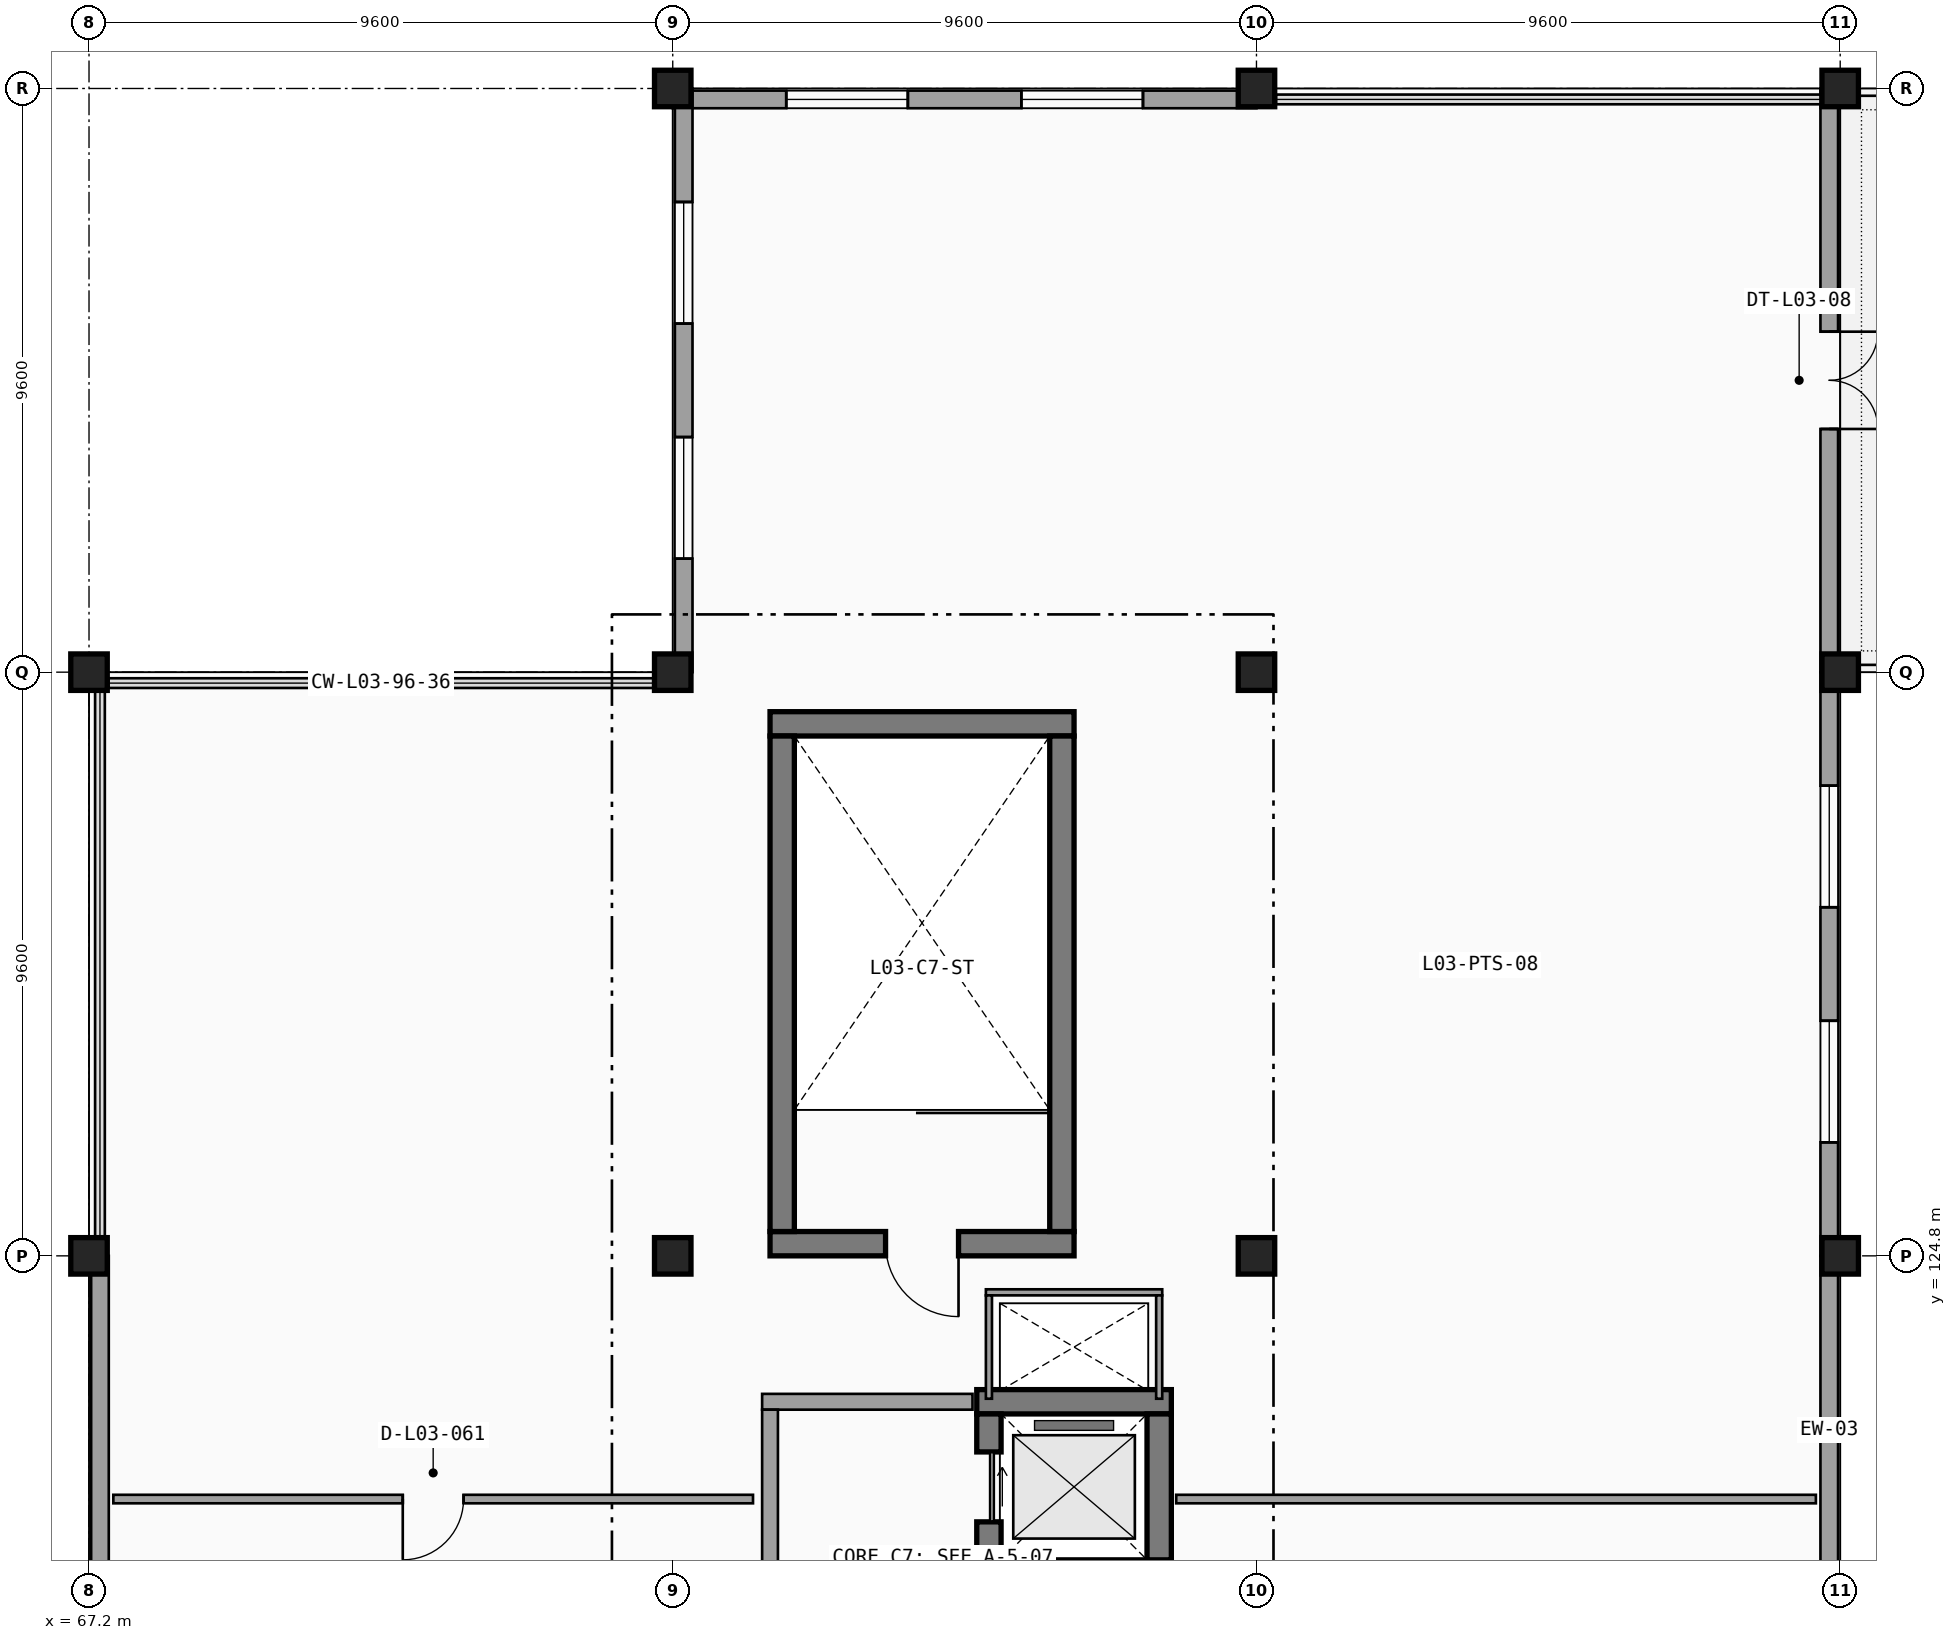
"""IFC4 building model, lengths in metres.
Left out: names, types, materials, properties, quantities, classifications, styles, units other than length and angle.
Written with IfcOpenShell. Run it as: python <this file> out.ifc"""

import sys

from ifc_helpers import new_model, si_unit, direction, frame, frame_2d, origin, origin_2d, place, context, subcontext, project, spatial, rectangle, extrude, element, fill, save


model = new_model("IFC4")
c1 = context("Model", 3, precision=1e-05, world=origin(), true_north=direction((0.0, 1.0)))
c2 = subcontext(c1, "Body", "Model", "MODEL_VIEW")
j1 = project(units=[si_unit("LENGTHUNIT", "METRE"), si_unit("PLANEANGLEUNIT", "RADIAN")], contexts=[c1])
p1 = place(None, origin())
s1 = spatial("IfcSite", under=j1, at=p1, CompositionType="ELEMENT")
p2 = place(p1, origin())
s2 = spatial("IfcBuilding", under=s1, at=p2, CompositionType="ELEMENT")
p3 = place(p2, frame((0.0, 0.0, 14.1)))
s3 = spatial("IfcBuildingStorey", under=s2, at=p3, CompositionType="ELEMENT", Elevation=14.1)
for number, where, z_axis, x_axis in (
    (1, (67.2, 124.8, 0.0), (0.0, 0.0, 1.0), (1.0, 0.0, 0.0)),
    (2, (67.2, 134.4, 0.0), (0.0, 0.0, 1.0), (1.0, 0.0, 0.0)),
    (3, (76.8, 124.8, 0.0), (0.0, 0.0, 1.0), (1.0, 0.0, 0.0)),
    (4, (76.8, 134.4, 0.0), (0.0, 0.0, 1.0), (1.0, 0.0, 0.0)),
    (5, (76.8, 144.0, 0.0), (0.0, 0.0, 1.0), (1.0, 0.0, 0.0)),
    (6, (86.4, 124.8, 0.0), (0.0, 0.0, 1.0), (1.0, 0.0, 0.0)),
    (7, (86.4, 134.4, 0.0), (0.0, 0.0, 1.0), (1.0, 0.0, 0.0)),
    (8, (86.4, 144.0, 0.0), (0.0, 0.0, 1.0), (1.0, 0.0, 0.0)),
    (9, (96.0, 124.8, 0.0), (0.0, 0.0, 1.0), (1.0, 0.0, 0.0)),
    (10, (96.0, 134.4, 0.0), (0.0, 0.0, 1.0), (1.0, 0.0, 0.0)),
    (11, (96.0, 144.0, 0.0), (0.0, 0.0, 1.0), (1.0, 0.0, 0.0)),
):
    element("IfcColumn", number, at=place(p3, frame(where, z_axis=z_axis, x_axis=x_axis)), inside=s3, PredefinedType="COLUMN", context=c2, shape_type="SweptSolid", body=[
        extrude(rectangle(XDim=0.6, YDim=0.6, at=origin_2d()), origin(), (0.0, 0.0, 1.0), 4.5),
    ])
p4 = place(p3, frame((95.82, 115.2, 0.0), z_axis=(0.0, 0.0, 1.0), x_axis=(0.0, 1.0, 0.0)))
e12 = element("IfcWall", 12, at=p4, inside=s3, PredefinedType="SOLIDWALL", context=c2, shape_type="SweptSolid", body=[
    extrude(rectangle(XDim=9.6, YDim=0.29, at=frame_2d((4.8, 0.0))), origin(), (0.0, 0.0, 1.0), 3.313),
])
p5 = place(p4, frame((3.867, 0.0, 0.95), z_axis=(0.0, 0.0, 1.0), x_axis=(-1.0, 0.0, 0.0)))
e13 = element("IfcOpeningElement", 13, at=p5, cuts=e12, PredefinedType="OPENING", context=c2, shape_type="SweptSolid", body=[
    extrude(rectangle(XDim=2.0, YDim=2.0, at=frame_2d((1.0, 1.0))), frame((0.0, 0.155, 0.0), z_axis=(0.0, -1.0, 0.0), x_axis=(1.0, 0.0, 0.0)), (0.0, 0.0, 1.0), 0.31),
])
p6 = place(p3, frame((95.82, 124.8, 0.0), z_axis=(0.0, 0.0, 1.0), x_axis=(0.0, 1.0, 0.0)))
e14 = element("IfcWall", 14, at=p6, inside=s3, PredefinedType="SOLIDWALL", context=c2, shape_type="SweptSolid", body=[
    extrude(rectangle(XDim=9.6, YDim=0.29, at=frame_2d((4.8, 0.0))), origin(), (0.0, 0.0, 1.0), 3.638),
])
p7 = place(p6, frame((3.867, 0.0, 0.95), z_axis=(0.0, 0.0, 1.0), x_axis=(-1.0, 0.0, 0.0)))
e15 = element("IfcOpeningElement", 15, at=p7, cuts=e14, PredefinedType="OPENING", context=c2, shape_type="SweptSolid", body=[
    extrude(rectangle(XDim=2.0, YDim=2.0, at=frame_2d((1.0, 1.0))), frame((0.0, 0.155, 0.0), z_axis=(0.0, -1.0, 0.0), x_axis=(1.0, 0.0, 0.0)), (0.0, 0.0, 1.0), 0.31),
])
p8 = place(p6, frame((7.733, 0.0, 0.95), z_axis=(0.0, 0.0, 1.0), x_axis=(-1.0, 0.0, 0.0)))
e16 = element("IfcOpeningElement", 16, at=p8, cuts=e14, PredefinedType="OPENING", context=c2, shape_type="SweptSolid", body=[
    extrude(rectangle(XDim=2.0, YDim=2.0, at=frame_2d((1.0, 1.0))), frame((0.0, 0.155, 0.0), z_axis=(0.0, -1.0, 0.0), x_axis=(1.0, 0.0, 0.0)), (0.0, 0.0, 1.0), 0.31),
])
p9 = place(p3, frame((95.82, 134.4, 0.0), z_axis=(0.0, 0.0, 1.0), x_axis=(0.0, 1.0, 0.0)))
e17 = element("IfcWall", 17, at=p9, inside=s3, PredefinedType="SOLIDWALL", context=c2, shape_type="SweptSolid", body=[
    extrude(rectangle(XDim=9.6, YDim=0.29, at=frame_2d((4.8, 0.0))), origin(), (0.0, 0.0, 1.0), 3.638),
])
p10 = place(p9, frame((5.6, 0.0, 0.0), z_axis=(0.0, 0.0, 1.0), x_axis=(-1.0, 0.0, 0.0)))
e18 = element("IfcOpeningElement", 18, at=p10, cuts=e17, PredefinedType="OPENING", context=c2, shape_type="SweptSolid", body=[
    extrude(rectangle(XDim=1.6, YDim=2.25, at=frame_2d((0.8, 1.125))), frame((0.0, 0.155, 0.0), z_axis=(0.0, -1.0, 0.0), x_axis=(1.0, 0.0, 0.0)), (0.0, 0.0, 1.0), 0.31),
])
p11 = place(p3, frame((86.4, 143.82, 0.0), z_axis=(0.0, 0.0, 1.0), x_axis=(-1.0, 0.0, 0.0)))
e19 = element("IfcWall", 19, at=p11, inside=s3, PredefinedType="SOLIDWALL", context=c2, shape_type="SweptSolid", body=[
    extrude(rectangle(XDim=9.6, YDim=0.29, at=frame_2d((4.8, 0.0))), origin(), (0.0, 0.0, 1.0), 3.313),
])
p12 = place(p11, frame((3.867, 0.0, 0.95), z_axis=(0.0, 0.0, 1.0), x_axis=(-1.0, 0.0, 0.0)))
e20 = element("IfcOpeningElement", 20, at=p12, cuts=e19, PredefinedType="OPENING", context=c2, shape_type="SweptSolid", body=[
    extrude(rectangle(XDim=2.0, YDim=2.0, at=frame_2d((1.0, 1.0))), frame((0.0, 0.155, 0.0), z_axis=(0.0, -1.0, 0.0), x_axis=(1.0, 0.0, 0.0)), (0.0, 0.0, 1.0), 0.31),
])
p13 = place(p11, frame((7.733, 0.0, 0.95), z_axis=(0.0, 0.0, 1.0), x_axis=(-1.0, 0.0, 0.0)))
e21 = element("IfcOpeningElement", 21, at=p13, cuts=e19, PredefinedType="OPENING", context=c2, shape_type="SweptSolid", body=[
    extrude(rectangle(XDim=2.0, YDim=2.0, at=frame_2d((1.0, 1.0))), frame((0.0, 0.155, 0.0), z_axis=(0.0, -1.0, 0.0), x_axis=(1.0, 0.0, 0.0)), (0.0, 0.0, 1.0), 0.31),
])
p14 = place(p3, frame((76.98, 144.0, 0.0), z_axis=(0.0, 0.0, 1.0), x_axis=(0.0, -1.0, 0.0)))
e22 = element("IfcWall", 22, at=p14, inside=s3, PredefinedType="SOLIDWALL", context=c2, shape_type="SweptSolid", body=[
    extrude(rectangle(XDim=9.6, YDim=0.29, at=frame_2d((4.8, 0.0))), origin(), (0.0, 0.0, 1.0), 3.638),
])
p15 = place(p14, frame((3.867, 0.0, 0.95), z_axis=(0.0, 0.0, 1.0), x_axis=(-1.0, 0.0, 0.0)))
e23 = element("IfcOpeningElement", 23, at=p15, cuts=e22, PredefinedType="OPENING", context=c2, shape_type="SweptSolid", body=[
    extrude(rectangle(XDim=2.0, YDim=2.0, at=frame_2d((1.0, 1.0))), frame((0.0, 0.155, 0.0), z_axis=(0.0, -1.0, 0.0), x_axis=(1.0, 0.0, 0.0)), (0.0, 0.0, 1.0), 0.31),
])
p16 = place(p14, frame((7.733, 0.0, 0.95), z_axis=(0.0, 0.0, 1.0), x_axis=(-1.0, 0.0, 0.0)))
e24 = element("IfcOpeningElement", 24, at=p16, cuts=e22, PredefinedType="OPENING", context=c2, shape_type="SweptSolid", body=[
    extrude(rectangle(XDim=2.0, YDim=2.0, at=frame_2d((1.0, 1.0))), frame((0.0, 0.155, 0.0), z_axis=(0.0, -1.0, 0.0), x_axis=(1.0, 0.0, 0.0)), (0.0, 0.0, 1.0), 0.31),
])
p17 = place(p3, frame((67.38, 124.8, 0.0), z_axis=(0.0, 0.0, 1.0), x_axis=(0.0, -1.0, 0.0)))
e25 = element("IfcWall", 25, at=p17, inside=s3, PredefinedType="SOLIDWALL", context=c2, shape_type="SweptSolid", body=[
    extrude(rectangle(XDim=9.6, YDim=0.29, at=frame_2d((4.8, 0.0))), origin(), (0.0, 0.0, 1.0), 3.638),
])
p18 = place(p17, frame((7.733, 0.0, 0.95), z_axis=(0.0, 0.0, 1.0), x_axis=(-1.0, 0.0, 0.0)))
e26 = element("IfcOpeningElement", 26, at=p18, cuts=e25, PredefinedType="OPENING", context=c2, shape_type="SweptSolid", body=[
    extrude(rectangle(XDim=2.0, YDim=2.0, at=frame_2d((1.0, 1.0))), frame((0.0, 0.155, 0.0), z_axis=(0.0, -1.0, 0.0), x_axis=(1.0, 0.0, 0.0)), (0.0, 0.0, 1.0), 0.31),
])
p19 = place(p3, frame((78.4, 125.0, 0.0), z_axis=(0.0, 0.0, 1.0), x_axis=(1.0, 0.0, 0.0)))
e27 = element("IfcWall", 27, at=p19, inside=s3, PredefinedType="SHEAR", context=c2, shape_type="SweptSolid", body=[
    extrude(rectangle(XDim=5.0, YDim=0.4, at=frame_2d((2.5, 0.0))), origin(), (0.0, 0.0, 1.0), 4.24),
])
p20 = place(p19, frame((3.1, 0.0, 0.0), z_axis=(0.0, 0.0, 1.0), x_axis=(-1.0, 0.0, 0.0)))
e28 = element("IfcOpeningElement", 28, at=p20, cuts=e27, PredefinedType="OPENING", context=c2, shape_type="SweptSolid", body=[
    extrude(rectangle(XDim=1.2, YDim=2.2, at=frame_2d((0.6, 1.1))), frame((0.0, 0.21, 0.0), z_axis=(0.0, -1.0, 0.0), x_axis=(1.0, 0.0, 0.0)), (0.0, 0.0, 1.0), 0.42),
])
p21 = place(p3, frame((83.4, 133.55, 0.0), z_axis=(0.0, 0.0, 1.0), x_axis=(-1.0, 0.0, 0.0)))
e29 = element("IfcWall", 29, at=p21, inside=s3, PredefinedType="SHEAR", context=c2, shape_type="SweptSolid", body=[
    extrude(rectangle(XDim=5.0, YDim=0.4, at=frame_2d((2.5, 0.0))), origin(), (0.0, 0.0, 1.0), 4.24),
])
for number, where, z_axis, x_axis in (
    (30, (78.6, 133.35, 0.0), (0.0, 0.0, 1.0), (0.0, -1.0, 0.0)),
    (31, (83.2, 125.2, 0.0), (0.0, 0.0, 1.0), (0.0, 1.0, 0.0)),
):
    element("IfcWall", number, at=place(p3, frame(where, z_axis=z_axis, x_axis=x_axis)), inside=s3, PredefinedType="SHEAR", context=c2, shape_type="SweptSolid", body=[
        extrude(rectangle(XDim=8.15, YDim=0.4, at=frame_2d((4.075, 0.0))), origin(), (0.0, 0.0, 1.0), 4.24),
    ])
p22 = place(p3, frame((85.0, 122.4, 0.0), z_axis=(0.0, 0.0, 1.0), x_axis=(-1.0, 0.0, 0.0)))
e32 = element("IfcWall", 32, at=p22, inside=s3, PredefinedType="SHEAR", context=c2, shape_type="SweptSolid", body=[
    extrude(rectangle(XDim=3.2, YDim=0.4, at=frame_2d((1.6, 0.0))), origin(), (0.0, 0.0, 1.0), 4.24),
])
p23 = place(p3, frame((82.0, 122.2, 0.0), z_axis=(0.0, 0.0, 1.0), x_axis=(0.0, -1.0, 0.0)))
e33 = element("IfcWall", 33, at=p23, inside=s3, PredefinedType="SHEAR", context=c2, shape_type="SweptSolid", body=[
    extrude(rectangle(XDim=2.4, YDim=0.4, at=frame_2d((1.2, 0.0))), origin(), (0.0, 0.0, 1.0), 4.24),
])
p24 = place(p23, frame((0.625, 0.0, 0.0), z_axis=(0.0, 0.0, 1.0), x_axis=(1.0, 0.0, 0.0)))
e34 = element("IfcOpeningElement", 34, at=p24, cuts=e33, PredefinedType="OPENING", context=c2, shape_type="SweptSolid", body=[
    extrude(rectangle(XDim=1.15, YDim=2.2, at=frame_2d((0.575, 1.1))), frame((0.0, 0.21, 0.0), z_axis=(0.0, -1.0, 0.0), x_axis=(1.0, 0.0, 0.0)), (0.0, 0.0, 1.0), 0.42),
])
p25 = place(p3, frame((84.8, 119.8, 0.0), z_axis=(0.0, 0.0, 1.0), x_axis=(0.0, 1.0, 0.0)))
e35 = element("IfcWall", 35, at=p25, inside=s3, PredefinedType="SHEAR", context=c2, shape_type="SweptSolid", body=[
    extrude(rectangle(XDim=2.4, YDim=0.4, at=frame_2d((1.2, 0.0))), origin(), (0.0, 0.0, 1.0), 4.24),
])
p26 = place(p3, frame((84.85, 124.2, 0.0), z_axis=(0.0, 0.0, 1.0), x_axis=(-1.0, 0.0, 0.0)))
e36 = element("IfcWall", 36, at=p26, inside=s3, PredefinedType="PARTITIONING", context=c2, shape_type="SweptSolid", body=[
    extrude(rectangle(XDim=2.9, YDim=0.1, at=frame_2d((1.45, 0.0))), origin(), (0.0, 0.0, 1.0), 4.24),
])
for number, where, z_axis, x_axis in (
    (37, (82.0, 124.15, 0.0), (0.0, 0.0, 1.0), (0.0, -1.0, 0.0)),
    (38, (84.8, 122.45, 0.0), (0.0, 0.0, 1.0), (0.0, 1.0, 0.0)),
):
    element("IfcWall", number, at=place(p3, frame(where, z_axis=z_axis, x_axis=x_axis)), inside=s3, PredefinedType="PARTITIONING", context=c2, shape_type="SweptSolid", body=[
        extrude(rectangle(XDim=1.7, YDim=0.1, at=frame_2d((0.85, 0.0))), origin(), (0.0, 0.0, 1.0), 4.24),
    ])
p27 = place(p3, frame((81.73, 122.4, 0.0), z_axis=(0.0, 0.0, 1.0), x_axis=(-1.0, 0.0, 0.0)))
e39 = element("IfcWall", 39, at=p27, inside=s3, PredefinedType="SOLIDWALL", context=c2, shape_type="SweptSolid", body=[
    extrude(rectangle(XDim=3.46, YDim=0.26, at=frame_2d((1.73, 0.0))), origin(), (0.0, 0.0, 1.0), 4.24),
])
p28 = place(p3, frame((78.4, 122.27, 0.0), z_axis=(0.0, 0.0, 1.0), x_axis=(0.0, -1.0, 0.0)))
e40 = element("IfcWall", 40, at=p28, inside=s3, PredefinedType="SOLIDWALL", context=c2, shape_type="SweptSolid", body=[
    extrude(rectangle(XDim=5.34, YDim=0.26, at=frame_2d((2.67, 0.0))), origin(), (0.0, 0.0, 1.0), 4.24),
])
p29 = place(p3, frame((95.6, 120.8, 0.0), z_axis=(0.0, 0.0, 1.0), x_axis=(-1.0, 0.0, 0.0)))
e41 = element("IfcWall", 41, at=p29, inside=s3, PredefinedType="PARTITIONING", context=c2, shape_type="SweptSolid", body=[
    extrude(rectangle(XDim=10.52, YDim=0.14, at=frame_2d((5.26, 0.0))), origin(), (0.0, 0.0, 1.0), 3.638),
])
p30 = place(p3, frame((78.12, 120.8, 0.0), z_axis=(0.0, 0.0, 1.0), x_axis=(-1.0, 0.0, 0.0)))
e42 = element("IfcWall", 42, at=p30, inside=s3, PredefinedType="PARTITIONING", context=c2, shape_type="SweptSolid", body=[
    extrude(rectangle(XDim=10.52, YDim=0.14, at=frame_2d((5.26, 0.0))), origin(), (0.0, 0.0, 1.0), 3.638),
])
p31 = place(p30, frame((4.76, 0.0, 0.0), z_axis=(0.0, 0.0, 1.0), x_axis=(1.0, 0.0, 0.0)))
e43 = element("IfcOpeningElement", 43, at=p31, cuts=e42, PredefinedType="OPENING", context=c2, shape_type="SweptSolid", body=[
    extrude(rectangle(XDim=1.0, YDim=2.2, at=frame_2d((0.5, 1.1))), frame((0.0, 0.08, 0.0), z_axis=(0.0, -1.0, 0.0), x_axis=(1.0, 0.0, 0.0)), (0.0, 0.0, 1.0), 0.16),
])
p32 = place(p7, origin())
e44 = element("IfcWindow", 44, at=p32, inside=s3, PartitioningType="SINGLE_PANEL", PredefinedType="WINDOW", context=c2, shape_type="SweptSolid", body=[
    extrude(rectangle(XDim=2.0, YDim=2.0, at=frame_2d((1.0, 1.0))), frame((0.0, 0.03, 0.0), z_axis=(0.0, -1.0, 0.0), x_axis=(1.0, 0.0, 0.0)), (0.0, 0.0, 1.0), 0.06),
])
fill(e15, e44)
p33 = place(p8, origin())
e45 = element("IfcWindow", 45, at=p33, inside=s3, PartitioningType="SINGLE_PANEL", PredefinedType="WINDOW", context=c2, shape_type="SweptSolid", body=[
    extrude(rectangle(XDim=2.0, YDim=2.0, at=frame_2d((1.0, 1.0))), frame((0.0, 0.03, 0.0), z_axis=(0.0, -1.0, 0.0), x_axis=(1.0, 0.0, 0.0)), (0.0, 0.0, 1.0), 0.06),
])
fill(e16, e45)
p34 = place(p10, origin())
e46 = element("IfcDoor", 46, at=p34, inside=s3, OperationType="DOUBLE_DOOR_SINGLE_SWING", PredefinedType="DOOR", context=c2, shape_type="SweptSolid", body=[
    extrude(rectangle(XDim=1.6, YDim=2.25, at=frame_2d((0.8, 1.125))), frame((0.0, 0.025, 0.0), z_axis=(0.0, -1.0, 0.0), x_axis=(1.0, 0.0, 0.0)), (0.0, 0.0, 1.0), 0.05),
])
fill(e18, e46)
p35 = place(p12, origin())
e47 = element("IfcWindow", 47, at=p35, inside=s3, PartitioningType="SINGLE_PANEL", PredefinedType="WINDOW", context=c2, shape_type="SweptSolid", body=[
    extrude(rectangle(XDim=2.0, YDim=2.0, at=frame_2d((1.0, 1.0))), frame((0.0, 0.03, 0.0), z_axis=(0.0, -1.0, 0.0), x_axis=(1.0, 0.0, 0.0)), (0.0, 0.0, 1.0), 0.06),
])
fill(e20, e47)
p36 = place(p13, origin())
e48 = element("IfcWindow", 48, at=p36, inside=s3, PartitioningType="SINGLE_PANEL", PredefinedType="WINDOW", context=c2, shape_type="SweptSolid", body=[
    extrude(rectangle(XDim=2.0, YDim=2.0, at=frame_2d((1.0, 1.0))), frame((0.0, 0.03, 0.0), z_axis=(0.0, -1.0, 0.0), x_axis=(1.0, 0.0, 0.0)), (0.0, 0.0, 1.0), 0.06),
])
fill(e21, e48)
p37 = place(p15, origin())
e49 = element("IfcWindow", 49, at=p37, inside=s3, PartitioningType="SINGLE_PANEL", PredefinedType="WINDOW", context=c2, shape_type="SweptSolid", body=[
    extrude(rectangle(XDim=2.0, YDim=2.0, at=frame_2d((1.0, 1.0))), frame((0.0, 0.03, 0.0), z_axis=(0.0, -1.0, 0.0), x_axis=(1.0, 0.0, 0.0)), (0.0, 0.0, 1.0), 0.06),
])
fill(e23, e49)
p38 = place(p16, origin())
e50 = element("IfcWindow", 50, at=p38, inside=s3, PartitioningType="SINGLE_PANEL", PredefinedType="WINDOW", context=c2, shape_type="SweptSolid", body=[
    extrude(rectangle(XDim=2.0, YDim=2.0, at=frame_2d((1.0, 1.0))), frame((0.0, 0.03, 0.0), z_axis=(0.0, -1.0, 0.0), x_axis=(1.0, 0.0, 0.0)), (0.0, 0.0, 1.0), 0.06),
])
fill(e24, e50)
p39 = place(p20, origin())
e51 = element("IfcDoor", 51, at=p39, inside=s3, OperationType="SINGLE_SWING_LEFT", PredefinedType="DOOR", context=c2, shape_type="SweptSolid", body=[
    extrude(rectangle(XDim=1.2, YDim=2.2, at=frame_2d((0.6, 1.1))), frame((0.0, 0.025, 0.0), z_axis=(0.0, -1.0, 0.0), x_axis=(1.0, 0.0, 0.0)), (0.0, 0.0, 1.0), 0.05),
])
fill(e28, e51)
p40 = place(p24, origin())
e52 = element("IfcDoor", 52, at=p40, inside=s3, OperationType="SLIDING_TO_LEFT", PredefinedType="DOOR", context=c2, shape_type="SweptSolid", body=[
    extrude(rectangle(XDim=1.15, YDim=2.2, at=frame_2d((0.575, 1.1))), frame((0.0, 0.025, 0.0), z_axis=(0.0, -1.0, 0.0), x_axis=(1.0, 0.0, 0.0)), (0.0, 0.0, 1.0), 0.05),
])
fill(e34, e52)
p41 = place(p31, origin())
e53 = element("IfcDoor", 53, at=p41, inside=s3, OperationType="SINGLE_SWING_RIGHT", PredefinedType="DOOR", context=c2, shape_type="SweptSolid", body=[
    extrude(rectangle(XDim=1.0, YDim=2.2, at=frame_2d((0.5, 1.1))), frame((0.0, 0.025, 0.0), z_axis=(0.0, -1.0, 0.0), x_axis=(1.0, 0.0, 0.0)), (0.0, 0.0, 1.0), 0.05),
])
fill(e43, e53)
save(model, sys.argv[1])
